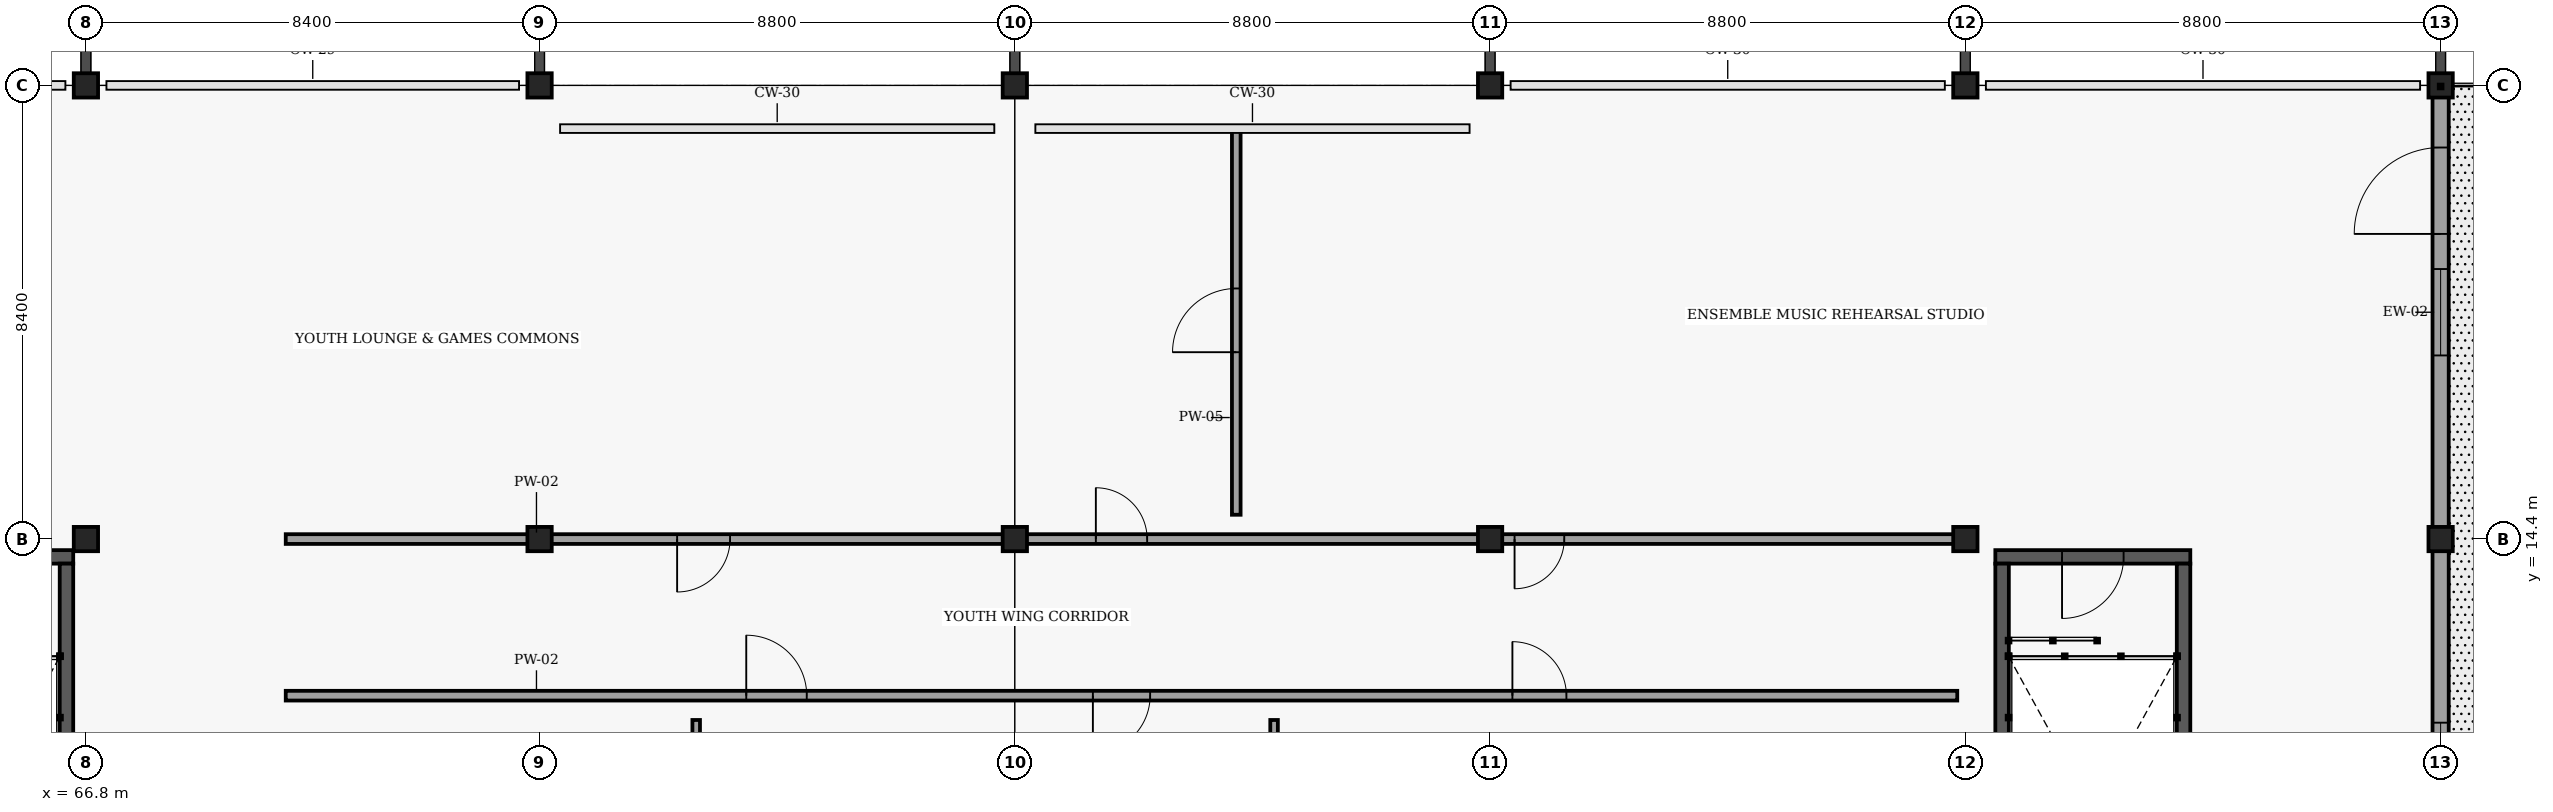
"""IFC4 building model, lengths in metres.
Left out: names, types, materials, properties, quantities, classifications, styles, units other than length and angle.
Written with IfcOpenShell. Run it as: python <this file> out.ifc"""

import sys

from ifc_helpers import new_model, si_unit, direction, frame, frame_2d, origin, origin_2d, place, context, subcontext, project, spatial, rectangle, extrude, element, fill, save


model = new_model("IFC4")
c1 = context("Model", 3, precision=1e-05, world=origin(), true_north=direction((0.0, 1.0)))
c2 = subcontext(c1, "Body", "Model", "MODEL_VIEW")
j1 = project(units=[si_unit("LENGTHUNIT", "METRE"), si_unit("PLANEANGLEUNIT", "RADIAN")], contexts=[c1])
p1 = place(None, origin())
s1 = spatial("IfcSite", under=j1, at=p1, CompositionType="ELEMENT")
p2 = place(p1, origin())
s2 = spatial("IfcBuilding", under=s1, at=p2, CompositionType="ELEMENT")
p3 = place(p2, frame((0.0, 0.0, 9.0)))
s3 = spatial("IfcBuildingStorey", under=s2, at=p3, CompositionType="ELEMENT", Elevation=9.0)
for number, where, z_axis, x_axis in (
    (1, (66.8, 14.4, 0.0), (0.0, 0.0, 1.0), (1.0, 0.0, 0.0)),
    (2, (66.8, 22.8, 0.0), (0.0, 0.0, 1.0), (1.0, 0.0, 0.0)),
    (3, (75.2, 14.4, 0.0), (0.0, 0.0, 1.0), (1.0, 0.0, 0.0)),
    (4, (75.2, 22.8, 0.0), (0.0, 0.0, 1.0), (1.0, 0.0, 0.0)),
    (5, (84.0, 14.4, 0.0), (0.0, 0.0, 1.0), (1.0, 0.0, 0.0)),
    (6, (84.0, 22.8, 0.0), (0.0, 0.0, 1.0), (1.0, 0.0, 0.0)),
    (7, (92.8, 14.4, 0.0), (0.0, 0.0, 1.0), (1.0, 0.0, 0.0)),
    (8, (92.8, 22.8, 0.0), (0.0, 0.0, 1.0), (1.0, 0.0, 0.0)),
    (9, (101.6, 14.4, 0.0), (0.0, 0.0, 1.0), (1.0, 0.0, 0.0)),
    (10, (101.6, 22.8, 0.0), (0.0, 0.0, 1.0), (1.0, 0.0, 0.0)),
    (11, (110.4, 14.4, 0.0), (0.0, 0.0, 1.0), (1.0, 0.0, 0.0)),
    (12, (110.4, 22.8, 0.0), (0.0, 0.0, 1.0), (1.0, 0.0, 0.0)),
):
    element("IfcColumn", number, at=place(p3, frame(where, z_axis=z_axis, x_axis=x_axis)), inside=s3, PredefinedType="COLUMN", context=c2, shape_type="SweptSolid", body=[
        extrude(rectangle(XDim=0.45, YDim=0.45, at=origin_2d()), origin(), (0.0, 0.0, 1.0), 3.9),
    ])
p4 = place(p3, frame((110.4, 6.1, 0.0), z_axis=(0.0, 0.0, 1.0), x_axis=(0.0, 1.0, 0.0)))
e13 = element("IfcWall", 13, at=p4, inside=s3, PredefinedType="SOLIDWALL", context=c2, shape_type="SweptSolid", body=[
    extrude(rectangle(XDim=8.2, YDim=0.3, at=frame_2d((4.1, 0.0))), origin(), (0.0, 0.0, 1.0), 3.425),
])
p5 = place(p4, frame((3.3, 0.0, 0.9)))
e14 = element("IfcOpeningElement", 14, at=p5, cuts=e13, PredefinedType="OPENING", context=c2, shape_type="SweptSolid", body=[
    extrude(rectangle(XDim=1.6, YDim=2.1, at=frame_2d((0.8, 1.05))), frame((0.0, 0.16, 0.0), z_axis=(0.0, -1.0, 0.0), x_axis=(1.0, 0.0, 0.0)), (0.0, 0.0, 1.0), 0.32),
])
p6 = place(p3, frame((110.4, 14.5, 0.0), z_axis=(0.0, 0.0, 1.0), x_axis=(0.0, 1.0, 0.0)))
e15 = element("IfcWall", 15, at=p6, inside=s3, PredefinedType="SOLIDWALL", context=c2, shape_type="SweptSolid", body=[
    extrude(rectangle(XDim=8.2, YDim=0.3, at=frame_2d((4.1, 0.0))), origin(), (0.0, 0.0, 1.0), 3.425),
])
p7 = place(p6, frame((3.3, 0.0, 0.9)))
e16 = element("IfcOpeningElement", 16, at=p7, cuts=e15, PredefinedType="OPENING", context=c2, shape_type="SweptSolid", body=[
    extrude(rectangle(XDim=1.6, YDim=2.1, at=frame_2d((0.8, 1.05))), frame((0.0, 0.16, 0.0), z_axis=(0.0, -1.0, 0.0), x_axis=(1.0, 0.0, 0.0)), (0.0, 0.0, 1.0), 0.32),
])
p8 = place(p6, frame((5.55, 0.0, 0.0)))
e17 = element("IfcOpeningElement", 17, at=p8, cuts=e15, PredefinedType="OPENING", context=c2, shape_type="SweptSolid", body=[
    extrude(rectangle(XDim=1.6, YDim=2.2, at=frame_2d((0.8, 1.1))), frame((0.0, 0.16, 0.0), z_axis=(0.0, -1.0, 0.0), x_axis=(1.0, 0.0, 0.0)), (0.0, 0.0, 1.0), 0.32),
])
p9 = place(p3, frame((62.955, 14.07, 0.0), z_axis=(0.0, 0.0, 1.0), x_axis=(1.0, 0.0, 0.0)))
e18 = element("IfcWall", 18, at=p9, inside=s3, PredefinedType="SHEAR", context=c2, shape_type="SweptSolid", body=[
    extrude(rectangle(XDim=3.61, YDim=0.25, at=frame_2d((1.805, 0.0))), origin(), (0.0, 0.0, 1.0), 3.66),
])
p10 = place(p9, frame((1.205, 0.0, 0.0)))
e19 = element("IfcOpeningElement", 19, at=p10, cuts=e18, PredefinedType="OPENING", context=c2, shape_type="SweptSolid", body=[
    extrude(rectangle(XDim=1.2, YDim=2.15, at=frame_2d((0.6, 1.075))), frame((0.0, 0.135, 0.0), z_axis=(0.0, -1.0, 0.0), x_axis=(1.0, 0.0, 0.0)), (0.0, 0.0, 1.0), 0.27),
])
p11 = place(p3, frame((66.44, 13.945, 0.0), z_axis=(0.0, 0.0, 1.0), x_axis=(0.0, -1.0, 0.0)))
e20 = element("IfcWall", 20, at=p11, inside=s3, PredefinedType="SHEAR", context=c2, shape_type="SweptSolid", body=[
    extrude(rectangle(XDim=7.39, YDim=0.25, at=frame_2d((3.695, 0.0))), origin(), (0.0, 0.0, 1.0), 3.66),
])
p12 = place(p3, frame((102.155, 14.07, 0.0), z_axis=(0.0, 0.0, 1.0), x_axis=(1.0, 0.0, 0.0)))
e21 = element("IfcWall", 21, at=p12, inside=s3, PredefinedType="SHEAR", context=c2, shape_type="SweptSolid", body=[
    extrude(rectangle(XDim=3.61, YDim=0.25, at=frame_2d((1.805, 0.0))), origin(), (0.0, 0.0, 1.0), 3.66),
])
p13 = place(p12, frame((1.235, 0.0, 0.0)))
e22 = element("IfcOpeningElement", 22, at=p13, cuts=e21, PredefinedType="OPENING", context=c2, shape_type="SweptSolid", body=[
    extrude(rectangle(XDim=1.14, YDim=2.15, at=frame_2d((0.57, 1.075))), frame((0.0, 0.135, 0.0), z_axis=(0.0, -1.0, 0.0), x_axis=(1.0, 0.0, 0.0)), (0.0, 0.0, 1.0), 0.27),
])
for number, where, z_axis, x_axis in (
    (23, (105.64, 13.945, 0.0), (0.0, 0.0, 1.0), (0.0, -1.0, 0.0)),
    (24, (102.28, 6.555, 0.0), (0.0, 0.0, 1.0), (0.0, 1.0, 0.0)),
):
    element("IfcWall", number, at=place(p3, frame(where, z_axis=z_axis, x_axis=x_axis)), inside=s3, PredefinedType="SHEAR", context=c2, shape_type="SweptSolid", body=[
        extrude(rectangle(XDim=7.39, YDim=0.25, at=frame_2d((3.695, 0.0))), origin(), (0.0, 0.0, 1.0), 3.66),
    ])
p14 = place(p3, frame((70.5, 11.5, 0.0), z_axis=(0.0, 0.0, 1.0), x_axis=(1.0, 0.0, 0.0)))
e25 = element("IfcWall", 25, at=p14, inside=s3, PredefinedType="PARTITIONING", context=c2, shape_type="SweptSolid", body=[
    extrude(rectangle(XDim=30.95, YDim=0.18, at=frame_2d((15.475, 0.0))), origin(), (0.0, 0.0, 1.0), 3.425),
])
p15 = place(p14, frame((8.527, 0.0, 0.0)))
e26 = element("IfcOpeningElement", 26, at=p15, cuts=e25, PredefinedType="OPENING", context=c2, shape_type="SweptSolid", body=[
    extrude(rectangle(XDim=1.12, YDim=2.16, at=frame_2d((0.56, 1.08))), frame((0.0, 0.1, 0.0), z_axis=(0.0, -1.0, 0.0), x_axis=(1.0, 0.0, 0.0)), (0.0, 0.0, 1.0), 0.2),
])
p16 = place(p14, frame((14.945, 0.0, 0.0)))
e27 = element("IfcOpeningElement", 27, at=p16, cuts=e25, PredefinedType="OPENING", context=c2, shape_type="SweptSolid", body=[
    extrude(rectangle(XDim=1.06, YDim=2.16, at=frame_2d((0.53, 1.08))), frame((0.0, 0.1, 0.0), z_axis=(0.0, -1.0, 0.0), x_axis=(1.0, 0.0, 0.0)), (0.0, 0.0, 1.0), 0.2),
])
p17 = place(p14, frame((22.713, 0.0, 0.0)))
e28 = element("IfcOpeningElement", 28, at=p17, cuts=e25, PredefinedType="OPENING", context=c2, shape_type="SweptSolid", body=[
    extrude(rectangle(XDim=1.0, YDim=2.14, at=frame_2d((0.5, 1.07))), frame((0.0, 0.1, 0.0), z_axis=(0.0, -1.0, 0.0), x_axis=(1.0, 0.0, 0.0)), (0.0, 0.0, 1.0), 0.2),
])
p18 = place(p3, frame((70.5, 14.4, 0.0), z_axis=(0.0, 0.0, 1.0), x_axis=(1.0, 0.0, 0.0)))
e29 = element("IfcWall", 29, at=p18, inside=s3, PredefinedType="PARTITIONING", context=c2, shape_type="SweptSolid", body=[
    extrude(rectangle(XDim=30.95, YDim=0.18, at=frame_2d((15.475, 0.0))), origin(), (0.0, 0.0, 1.0), 3.346),
])
p19 = place(p18, frame((7.247, 0.0, 0.0)))
e30 = element("IfcOpeningElement", 30, at=p19, cuts=e29, PredefinedType="OPENING", context=c2, shape_type="SweptSolid", body=[
    extrude(rectangle(XDim=0.98, YDim=2.12, at=frame_2d((0.49, 1.06))), frame((0.0, 0.1, 0.0), z_axis=(0.0, -1.0, 0.0), x_axis=(1.0, 0.0, 0.0)), (0.0, 0.0, 1.0), 0.2),
])
p20 = place(p18, frame((15.0, 0.0, 0.0)))
e31 = element("IfcOpeningElement", 31, at=p20, cuts=e29, PredefinedType="OPENING", context=c2, shape_type="SweptSolid", body=[
    extrude(rectangle(XDim=0.95, YDim=2.12, at=frame_2d((0.475, 1.06))), frame((0.0, 0.1, 0.0), z_axis=(0.0, -1.0, 0.0), x_axis=(1.0, 0.0, 0.0)), (0.0, 0.0, 1.0), 0.2),
])
p21 = place(p18, frame((22.753, 0.0, 0.0)))
e32 = element("IfcOpeningElement", 32, at=p21, cuts=e29, PredefinedType="OPENING", context=c2, shape_type="SweptSolid", body=[
    extrude(rectangle(XDim=0.92, YDim=2.1, at=frame_2d((0.46, 1.05))), frame((0.0, 0.1, 0.0), z_axis=(0.0, -1.0, 0.0), x_axis=(1.0, 0.0, 0.0)), (0.0, 0.0, 1.0), 0.2),
])
p22 = place(p3, frame((78.1, 6.55, 0.0), z_axis=(0.0, 0.0, 1.0), x_axis=(0.0, 1.0, 0.0)))
e33 = element("IfcWall", 33, at=p22, inside=s3, PredefinedType="PARTITIONING", context=c2, shape_type="SweptSolid", body=[
    extrude(rectangle(XDim=4.5, YDim=0.14, at=frame_2d((2.25, 0.0))), origin(), (0.0, 0.0, 1.0), 3.527),
])
p23 = place(p22, frame((1.77, 0.0, 0.0)))
e34 = element("IfcOpeningElement", 34, at=p23, cuts=e33, PredefinedType="OPENING", context=c2, shape_type="SweptSolid", body=[
    extrude(rectangle(XDim=0.96, YDim=2.08, at=frame_2d((0.48, 1.04))), frame((0.0, 0.08, 0.0), z_axis=(0.0, -1.0, 0.0), x_axis=(1.0, 0.0, 0.0)), (0.0, 0.0, 1.0), 0.16),
])
p24 = place(p3, frame((88.8, 6.55, 0.0), z_axis=(0.0, 0.0, 1.0), x_axis=(0.0, 1.0, 0.0)))
e35 = element("IfcWall", 35, at=p24, inside=s3, PredefinedType="PARTITIONING", context=c2, shape_type="SweptSolid", body=[
    extrude(rectangle(XDim=4.5, YDim=0.14, at=frame_2d((2.25, 0.0))), origin(), (0.0, 0.0, 1.0), 3.645),
])
p25 = place(p24, frame((1.8, 0.0, 0.0)))
e36 = element("IfcOpeningElement", 36, at=p25, cuts=e35, PredefinedType="OPENING", context=c2, shape_type="SweptSolid", body=[
    extrude(rectangle(XDim=0.9, YDim=2.06, at=frame_2d((0.45, 1.03))), frame((0.0, 0.08, 0.0), z_axis=(0.0, -1.0, 0.0), x_axis=(1.0, 0.0, 0.0)), (0.0, 0.0, 1.0), 0.16),
])
p26 = place(p3, frame((88.1, 14.85, 0.0), z_axis=(0.0, 0.0, 1.0), x_axis=(0.0, 1.0, 0.0)))
e37 = element("IfcWall", 37, at=p26, inside=s3, PredefinedType="PARTITIONING", context=c2, shape_type="SweptSolid", body=[
    extrude(rectangle(XDim=7.2, YDim=0.16, at=frame_2d((3.6, 0.0))), origin(), (0.0, 0.0, 1.0), 3.645),
])
p27 = place(p26, frame((3.01, 0.0, 0.0)))
e38 = element("IfcOpeningElement", 38, at=p27, cuts=e37, PredefinedType="OPENING", context=c2, shape_type="SweptSolid", body=[
    extrude(rectangle(XDim=1.18, YDim=2.18, at=frame_2d((0.59, 1.09))), frame((0.0, 0.09, 0.0), z_axis=(0.0, -1.0, 0.0), x_axis=(1.0, 0.0, 0.0)), (0.0, 0.0, 1.0), 0.18),
])
p28 = place(p5, origin())
e39 = element("IfcWindow", 39, at=p28, inside=s3, PartitioningType="SINGLE_PANEL", PredefinedType="WINDOW", context=c2, shape_type="SweptSolid", body=[
    extrude(rectangle(XDim=1.6, YDim=2.1, at=frame_2d((0.8, 1.05))), frame((0.0, 0.03, 0.0), z_axis=(0.0, -1.0, 0.0), x_axis=(1.0, 0.0, 0.0)), (0.0, 0.0, 1.0), 0.06),
])
fill(e14, e39)
p29 = place(p7, origin())
e40 = element("IfcWindow", 40, at=p29, inside=s3, PartitioningType="SINGLE_PANEL", PredefinedType="WINDOW", context=c2, shape_type="SweptSolid", body=[
    extrude(rectangle(XDim=1.6, YDim=2.1, at=frame_2d((0.8, 1.05))), frame((0.0, 0.03, 0.0), z_axis=(0.0, -1.0, 0.0), x_axis=(1.0, 0.0, 0.0)), (0.0, 0.0, 1.0), 0.06),
])
fill(e16, e40)
p30 = place(p13, origin())
e41 = element("IfcDoor", 41, at=p30, inside=s3, OperationType="SINGLE_SWING_RIGHT", PredefinedType="DOOR", context=c2, shape_type="SweptSolid", body=[
    extrude(rectangle(XDim=1.14, YDim=2.15, at=frame_2d((0.57, 1.075))), frame((0.0, 0.025, 0.0), z_axis=(0.0, -1.0, 0.0), x_axis=(1.0, 0.0, 0.0)), (0.0, 0.0, 1.0), 0.05),
])
fill(e22, e41)
p31 = place(p8, origin())
e42 = element("IfcDoor", 42, at=p31, inside=s3, OperationType="DOUBLE_DOOR_SINGLE_SWING", PredefinedType="DOOR", context=c2, shape_type="SweptSolid", body=[
    extrude(rectangle(XDim=1.6, YDim=2.2, at=frame_2d((0.8, 1.1))), frame((0.0, 0.025, 0.0), z_axis=(0.0, -1.0, 0.0), x_axis=(1.0, 0.0, 0.0)), (0.0, 0.0, 1.0), 0.05),
])
fill(e17, e42)
p32 = place(p15, origin())
e43 = element("IfcDoor", 43, at=p32, inside=s3, OperationType="SINGLE_SWING_LEFT", PredefinedType="DOOR", context=c2, shape_type="SweptSolid", body=[
    extrude(rectangle(XDim=1.12, YDim=2.16, at=frame_2d((0.56, 1.08))), frame((0.0, 0.025, 0.0), z_axis=(0.0, -1.0, 0.0), x_axis=(1.0, 0.0, 0.0)), (0.0, 0.0, 1.0), 0.05),
])
fill(e26, e43)
p33 = place(p16, origin())
e44 = element("IfcDoor", 44, at=p33, inside=s3, OperationType="SINGLE_SWING_RIGHT", PredefinedType="DOOR", context=c2, shape_type="SweptSolid", body=[
    extrude(rectangle(XDim=1.06, YDim=2.16, at=frame_2d((0.53, 1.08))), frame((0.0, 0.025, 0.0), z_axis=(0.0, -1.0, 0.0), x_axis=(1.0, 0.0, 0.0)), (0.0, 0.0, 1.0), 0.05),
])
fill(e27, e44)
p34 = place(p17, origin())
e45 = element("IfcDoor", 45, at=p34, inside=s3, OperationType="SINGLE_SWING_LEFT", PredefinedType="DOOR", context=c2, shape_type="SweptSolid", body=[
    extrude(rectangle(XDim=1.0, YDim=2.14, at=frame_2d((0.5, 1.07))), frame((0.0, 0.025, 0.0), z_axis=(0.0, -1.0, 0.0), x_axis=(1.0, 0.0, 0.0)), (0.0, 0.0, 1.0), 0.05),
])
fill(e28, e45)
p35 = place(p19, origin())
e46 = element("IfcDoor", 46, at=p35, inside=s3, OperationType="SINGLE_SWING_RIGHT", PredefinedType="DOOR", context=c2, shape_type="SweptSolid", body=[
    extrude(rectangle(XDim=0.98, YDim=2.12, at=frame_2d((0.49, 1.06))), frame((0.0, 0.025, 0.0), z_axis=(0.0, -1.0, 0.0), x_axis=(1.0, 0.0, 0.0)), (0.0, 0.0, 1.0), 0.05),
])
fill(e30, e46)
p36 = place(p20, origin())
e47 = element("IfcDoor", 47, at=p36, inside=s3, OperationType="SINGLE_SWING_LEFT", PredefinedType="DOOR", context=c2, shape_type="SweptSolid", body=[
    extrude(rectangle(XDim=0.95, YDim=2.12, at=frame_2d((0.475, 1.06))), frame((0.0, 0.025, 0.0), z_axis=(0.0, -1.0, 0.0), x_axis=(1.0, 0.0, 0.0)), (0.0, 0.0, 1.0), 0.05),
])
fill(e31, e47)
p37 = place(p21, origin())
e48 = element("IfcDoor", 48, at=p37, inside=s3, OperationType="SINGLE_SWING_RIGHT", PredefinedType="DOOR", context=c2, shape_type="SweptSolid", body=[
    extrude(rectangle(XDim=0.92, YDim=2.1, at=frame_2d((0.46, 1.05))), frame((0.0, 0.025, 0.0), z_axis=(0.0, -1.0, 0.0), x_axis=(1.0, 0.0, 0.0)), (0.0, 0.0, 1.0), 0.05),
])
fill(e32, e48)
p38 = place(p27, origin())
e49 = element("IfcDoor", 49, at=p38, inside=s3, OperationType="SINGLE_SWING_LEFT", PredefinedType="DOOR", context=c2, shape_type="SweptSolid", body=[
    extrude(rectangle(XDim=1.18, YDim=2.18, at=frame_2d((0.59, 1.09))), frame((0.0, 0.025, 0.0), z_axis=(0.0, -1.0, 0.0), x_axis=(1.0, 0.0, 0.0)), (0.0, 0.0, 1.0), 0.05),
])
fill(e38, e49)
save(model, sys.argv[1])
